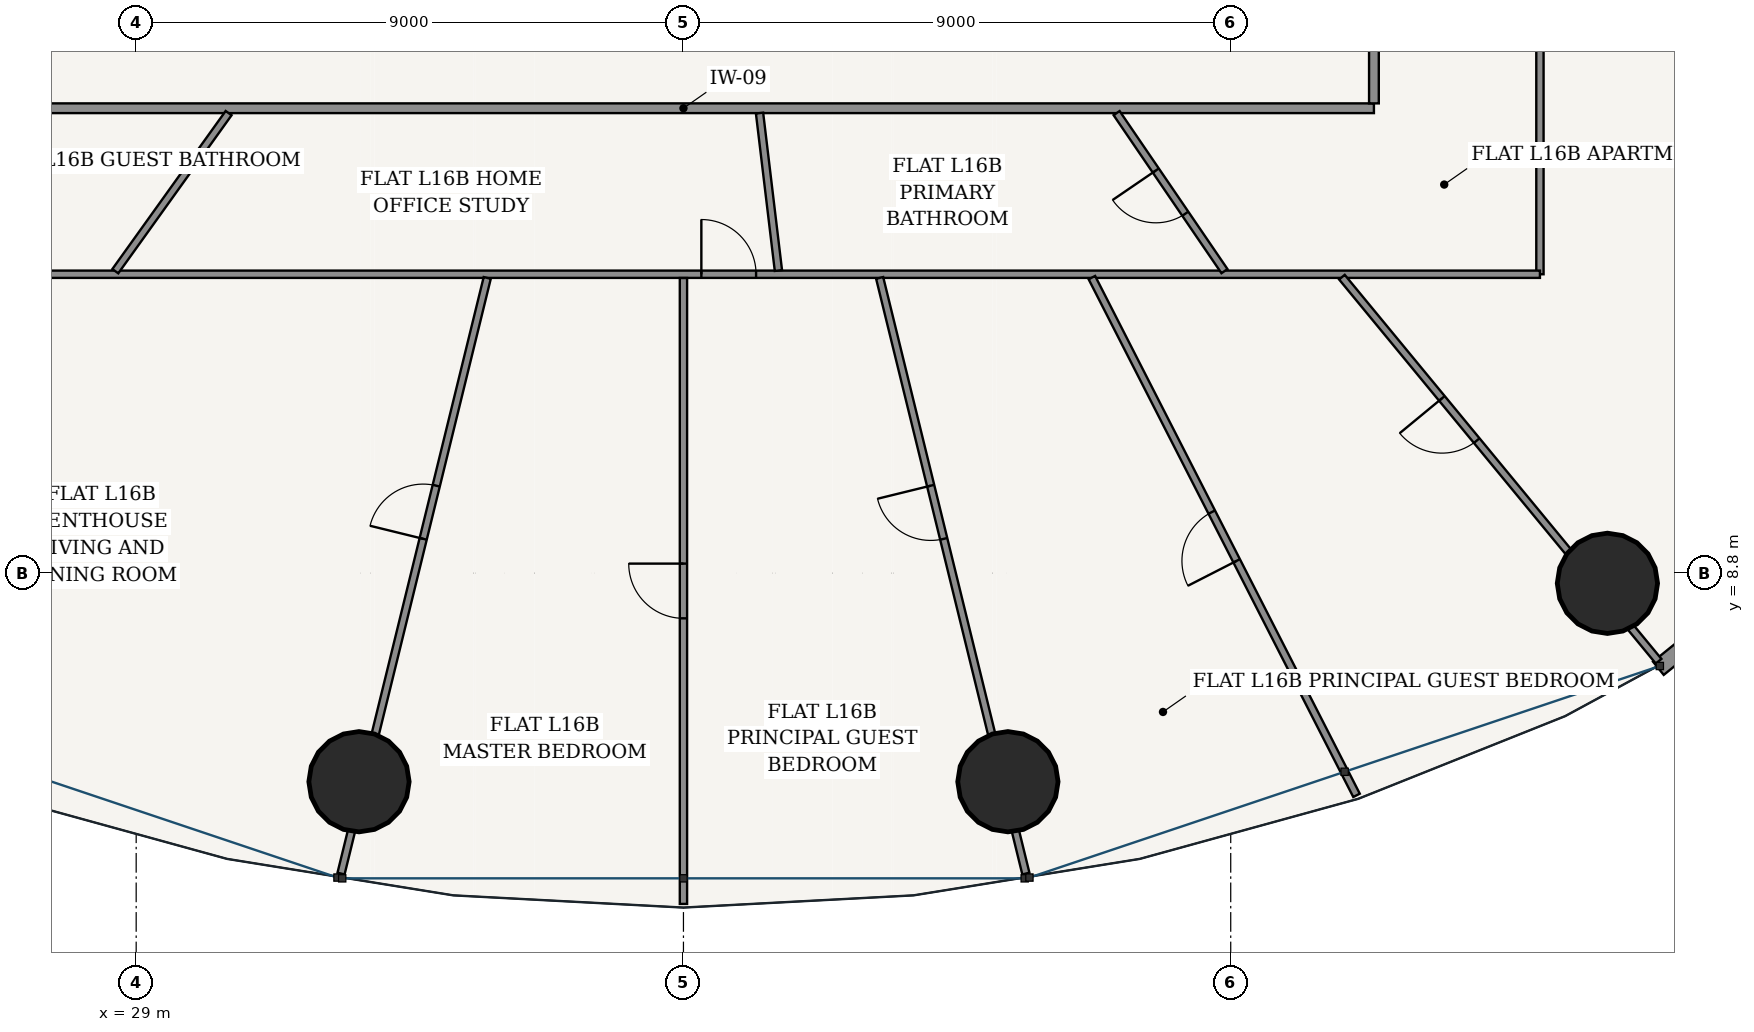
"""IFC4 building model, lengths in metres.
Left out: names, types, materials, properties, quantities, classifications, styles, units other than length and angle.
Written with IfcOpenShell. Run it as: python <this file> out.ifc"""

import sys

from ifc_helpers import new_model, si_unit, direction, frame, frame_2d, origin, origin_2d, place, context, subcontext, project, spatial, rectangle, hollow_circle, extrude, source, transform, mapped, element, fill, save


model = new_model("IFC4")
c1 = context("Model", 3, precision=1e-05, world=origin(), true_north=direction((-0.2419218956, 0.970295726276)))
c2 = subcontext(c1, "Body", "Model", "MODEL_VIEW")
j1 = project(units=[si_unit("LENGTHUNIT", "METRE"), si_unit("PLANEANGLEUNIT", "RADIAN")], contexts=[c1])
p1 = place(None, origin())
s1 = spatial("IfcSite", under=j1, at=p1, CompositionType="ELEMENT")
p2 = place(p1, origin())
s2 = spatial("IfcBuilding", under=s1, at=p2, CompositionType="ELEMENT")
p3 = place(p2, frame((0.0, 0.0, 63.6)))
s3 = spatial("IfcBuildingStorey", under=s2, at=p3, CompositionType="ELEMENT", Elevation=63.6)
for number, where, z_axis, x_axis in (
    (1, (32.664, 5.37, 0.0), (0.0, 0.0, 1.0), (1.0, 0.0, 0.0)),
    (2, (43.336, 5.37, 0.0), (0.0, 0.0, 1.0), (1.0, 0.0, 0.0)),
    (3, (53.195, 8.632, 0.0), (0.0, 0.0, 1.0), (1.0, 0.0, 0.0)),
):
    element("IfcColumn", number, at=place(p3, frame(where, z_axis=z_axis, x_axis=x_axis)), inside=s3, PredefinedType="COLUMN", context=c2, shape_type="SweptSolid", body=[
        extrude(hollow_circle(Radius=0.825, WallThickness=0.05, at=origin_2d()), origin(), (0.0, 0.0, 1.0), 3.6),
    ])
p4 = place(p3, frame((54.033, 7.235, 0.0), z_axis=(0.0, 0.0, 1.0), x_axis=(0.777016782851, 0.629479879875, 0.0)))
e4 = element("IfcWall", 4, at=p4, inside=s3, PredefinedType="SOLIDWALL", context=c2, shape_type="SweptSolid", body=[
    extrude(rectangle(XDim=10.447, YDim=0.28, at=frame_2d((5.223, 0.0))), origin(), (0.0, 0.0, 1.0), 3.32),
])
p5 = place(p4, frame((1.771, 0.0, 0.85)))
e5 = element("IfcOpeningElement", 5, at=p5, cuts=e4, PredefinedType="OPENING", context=c2, shape_type="SweptSolid", body=[
    extrude(rectangle(XDim=2.1, YDim=1.95, at=frame_2d((1.05, 0.975))), frame((0.0, 0.15, 0.0), z_axis=(0.0, -1.0, 0.0), x_axis=(1.0, 0.0, 0.0)), (0.0, 0.0, 1.0), 0.3),
])
p6 = place(p4, frame((6.576, 0.0, 0.85)))
e6 = element("IfcOpeningElement", 6, at=p6, cuts=e4, PredefinedType="OPENING", context=c2, shape_type="SweptSolid", body=[
    extrude(rectangle(XDim=2.1, YDim=1.95, at=frame_2d((1.05, 0.975))), frame((0.0, 0.15, 0.0), z_axis=(0.0, -1.0, 0.0), x_axis=(1.0, 0.0, 0.0)), (0.0, 0.0, 1.0), 0.3),
])
p7 = place(p3, frame((26.645, 16.445, 0.0), z_axis=(0.0, 0.0, 1.0), x_axis=(1.0, 0.0, 0.0)))
e7 = element("IfcWall", 7, at=p7, inside=s3, PredefinedType="PARTITIONING", context=c2, shape_type="SweptSolid", body=[
    extrude(rectangle(XDim=22.71, YDim=0.16, at=frame_2d((11.355, 0.0))), origin(), (0.0, 0.0, 1.0), 2.688),
])
p8 = place(p3, frame((49.355, 16.525, 0.0), z_axis=(0.0, 0.0, 1.0), x_axis=(0.0, 1.0, 0.0)))
e8 = element("IfcWall", 8, at=p8, inside=s3, PredefinedType="PARTITIONING", context=c2, shape_type="SweptSolid", body=[
    extrude(rectangle(XDim=20.55, YDim=0.16, at=frame_2d((10.275, 0.0))), origin(), (0.0, 0.0, 1.0), 2.688),
])
p9 = place(p8, frame((2.733, 0.0, 0.0)))
e9 = element("IfcOpeningElement", 9, at=p9, cuts=e8, PredefinedType="OPENING", context=c2, shape_type="SweptSolid", body=[
    extrude(rectangle(XDim=0.98, YDim=2.2, at=frame_2d((0.49, 1.1))), frame((0.0, 0.09, 0.0), z_axis=(0.0, -1.0, 0.0), x_axis=(1.0, 0.0, 0.0)), (0.0, 0.0, 1.0), 0.18),
])
p10 = place(p3, frame((52.085, 34.324, 0.0), z_axis=(0.0, 0.0, 1.0), x_axis=(0.0, -1.0, 0.0)))
e10 = element("IfcWall", 10, at=p10, inside=s3, PredefinedType="PARTITIONING", context=c2, shape_type="SweptSolid", body=[
    extrude(rectangle(XDim=20.609, YDim=0.12, at=frame_2d((10.305, 0.0))), origin(), (0.0, 0.0, 1.0), 2.688),
])
p11 = place(p10, frame((15.972, 0.0, 0.0)))
e11 = element("IfcOpeningElement", 11, at=p11, cuts=e10, PredefinedType="OPENING", context=c2, shape_type="SweptSolid", body=[
    extrude(rectangle(XDim=0.9, YDim=2.15, at=frame_2d((0.45, 1.075))), frame((0.0, 0.07, 0.0), z_axis=(0.0, -1.0, 0.0), x_axis=(1.0, 0.0, 0.0)), (0.0, 0.0, 1.0), 0.14),
])
p12 = place(p10, frame((3.058, 0.0, 0.0)))
e12 = element("IfcOpeningElement", 12, at=p12, cuts=e10, PredefinedType="OPENING", context=c2, shape_type="SweptSolid", body=[
    extrude(rectangle(XDim=0.9, YDim=2.15, at=frame_2d((0.45, 1.075))), frame((0.0, 0.07, 0.0), z_axis=(0.0, -1.0, 0.0), x_axis=(1.0, 0.0, 0.0)), (0.0, 0.0, 1.0), 0.14),
])
p13 = place(p3, frame((52.085, 13.715, 0.0), z_axis=(0.0, 0.0, 1.0), x_axis=(-1.0, 0.0, 0.0)))
e13 = element("IfcWall", 13, at=p13, inside=s3, PredefinedType="PARTITIONING", context=c2, shape_type="SweptSolid", body=[
    extrude(rectangle(XDim=28.17, YDim=0.12, at=frame_2d((14.085, 0.0))), origin(), (0.0, 0.0, 1.0), 2.688),
])
p14 = place(p13, frame((12.891, 0.0, 0.0)))
e14 = element("IfcOpeningElement", 14, at=p14, cuts=e13, PredefinedType="OPENING", context=c2, shape_type="SweptSolid", body=[
    extrude(rectangle(XDim=0.9, YDim=2.15, at=frame_2d((0.45, 1.075))), frame((0.0, 0.07, 0.0), z_axis=(0.0, -1.0, 0.0), x_axis=(1.0, 0.0, 0.0)), (0.0, 0.0, 1.0), 0.14),
])
p15 = place(p3, frame((34.773, 13.655, 0.0), z_axis=(0.0, 0.0, 1.0), x_axis=(-0.238375747469, -0.97117300365, 0.0)))
e15 = element("IfcWall", 15, at=p15, inside=s3, PredefinedType="PARTITIONING", context=c2, shape_type="SweptSolid", body=[
    extrude(rectangle(XDim=10.086, YDim=0.12, at=frame_2d((5.043, 0.0))), origin(), (0.0, 0.0, 1.0), 2.688),
])
p16 = place(p15, frame((3.518, 0.0, 0.0)))
e16 = element("IfcOpeningElement", 16, at=p16, cuts=e15, PredefinedType="OPENING", context=c2, shape_type="SweptSolid", body=[
    extrude(rectangle(XDim=0.9, YDim=2.15, at=frame_2d((0.45, 1.075))), frame((0.0, 0.07, 0.0), z_axis=(0.0, -1.0, 0.0), x_axis=(1.0, 0.0, 0.0)), (0.0, 0.0, 1.0), 0.14),
])
p17 = place(p3, frame((38.0, 13.653, 0.0), z_axis=(0.0, 0.0, 1.0), x_axis=(0.0, -1.0, 0.0)))
e17 = element("IfcWall", 17, at=p17, inside=s3, PredefinedType="PARTITIONING", context=c2, shape_type="SweptSolid", body=[
    extrude(rectangle(XDim=10.293, YDim=0.12, at=frame_2d((5.146, 0.0))), origin(), (0.0, 0.0, 1.0), 2.762),
])
p18 = place(p17, frame((4.697, 0.0, 0.0)))
e18 = element("IfcOpeningElement", 18, at=p18, cuts=e17, PredefinedType="OPENING", context=c2, shape_type="SweptSolid", body=[
    extrude(rectangle(XDim=0.9, YDim=2.15, at=frame_2d((0.45, 1.075))), frame((0.0, 0.07, 0.0), z_axis=(0.0, -1.0, 0.0), x_axis=(1.0, 0.0, 0.0)), (0.0, 0.0, 1.0), 0.14),
])
p19 = place(p3, frame((41.227, 13.655, 0.0), z_axis=(0.0, 0.0, 1.0), x_axis=(0.238375747469, -0.97117300365, 0.0)))
e19 = element("IfcWall", 19, at=p19, inside=s3, PredefinedType="PARTITIONING", context=c2, shape_type="SweptSolid", body=[
    extrude(rectangle(XDim=10.086, YDim=0.12, at=frame_2d((5.043, 0.0))), origin(), (0.0, 0.0, 1.0), 2.688),
])
p20 = place(p19, frame((3.519, 0.0, 0.0)))
e20 = element("IfcOpeningElement", 20, at=p20, cuts=e19, PredefinedType="OPENING", context=c2, shape_type="SweptSolid", body=[
    extrude(rectangle(XDim=0.9, YDim=2.15, at=frame_2d((0.45, 1.075))), frame((0.0, 0.07, 0.0), z_axis=(0.0, -1.0, 0.0), x_axis=(1.0, 0.0, 0.0)), (0.0, 0.0, 1.0), 0.14),
])
p21 = place(p3, frame((44.717, 13.66, 0.0), z_axis=(0.0, 0.0, 1.0), x_axis=(0.455131303234, -0.890424335256, 0.0)))
e21 = element("IfcWall", 21, at=p21, inside=s3, PredefinedType="PARTITIONING", context=c2, shape_type="SweptSolid", body=[
    extrude(rectangle(XDim=9.562, YDim=0.12, at=frame_2d((4.781, 0.0))), origin(), (0.0, 0.0, 1.0), 2.762),
])
p22 = place(p21, frame((4.331, 0.0, 0.0)))
e22 = element("IfcOpeningElement", 22, at=p22, cuts=e21, PredefinedType="OPENING", context=c2, shape_type="SweptSolid", body=[
    extrude(rectangle(XDim=0.9, YDim=2.15, at=frame_2d((0.45, 1.075))), frame((0.0, 0.07, 0.0), z_axis=(0.0, -1.0, 0.0), x_axis=(1.0, 0.0, 0.0)), (0.0, 0.0, 1.0), 0.14),
])
p23 = place(p3, frame((48.829, 13.667, 0.0), z_axis=(0.0, 0.0, 1.0), x_axis=(0.636177533893, -0.771542704826, 0.0)))
e23 = element("IfcWall", 23, at=p23, inside=s3, PredefinedType="PARTITIONING", context=c2, shape_type="SweptSolid", body=[
    extrude(rectangle(XDim=8.187, YDim=0.12, at=frame_2d((4.093, 0.0))), origin(), (0.0, 0.0, 1.0), 2.688),
])
p24 = place(p23, frame((2.584, 0.0, 0.0)))
e24 = element("IfcOpeningElement", 24, at=p24, cuts=e23, PredefinedType="OPENING", context=c2, shape_type="SweptSolid", body=[
    extrude(rectangle(XDim=0.9, YDim=2.15, at=frame_2d((0.45, 1.075))), frame((0.0, 0.07, 0.0), z_axis=(0.0, -1.0, 0.0), x_axis=(1.0, 0.0, 0.0)), (0.0, 0.0, 1.0), 0.14),
])
p25 = place(p3, frame((30.52, 16.365, 0.0), z_axis=(0.0, 0.0, 1.0), x_axis=(-0.582566008831, -0.812783393872, 0.0)))
e25 = element("IfcWall", 25, at=p25, inside=s3, PredefinedType="PARTITIONING", context=c2, shape_type="SweptSolid", body=[
    extrude(rectangle(XDim=3.198, YDim=0.12, at=frame_2d((1.599, 0.0))), origin(), (0.0, 0.0, 1.0), 3.32),
])
p26 = place(p3, frame((39.251, 16.365, 0.0), z_axis=(0.0, 0.0, 1.0), x_axis=(0.1191230636, -0.992879497078, 0.0)))
e26 = element("IfcWall", 26, at=p26, inside=s3, PredefinedType="PARTITIONING", context=c2, shape_type="SweptSolid", body=[
    extrude(rectangle(XDim=2.607, YDim=0.12, at=frame_2d((1.303, 0.0))), origin(), (0.0, 0.0, 1.0), 3.32),
])
p27 = place(p3, frame((45.123, 16.365, 0.0), z_axis=(0.0, 0.0, 1.0), x_axis=(0.563762888243, -0.825936683917, 0.0)))
e27 = element("IfcWall", 27, at=p27, inside=s3, PredefinedType="PARTITIONING", context=c2, shape_type="SweptSolid", body=[
    extrude(rectangle(XDim=3.146, YDim=0.12, at=frame_2d((1.573, 0.0))), origin(), (0.0, 0.0, 1.0), 3.32),
])
p28 = place(p27, frame((1.143, 0.0, 0.0)))
e28 = element("IfcOpeningElement", 28, at=p28, cuts=e27, PredefinedType="OPENING", context=c2, shape_type="SweptSolid", body=[
    extrude(rectangle(XDim=0.86, YDim=2.15, at=frame_2d((0.43, 1.075))), frame((0.0, 0.07, 0.0), z_axis=(0.0, -1.0, 0.0), x_axis=(1.0, 0.0, 0.0)), (0.0, 0.0, 1.0), 0.14),
])
m1 = source(origin(), c2, "Body", "SweptSolid", [
    extrude(rectangle(XDim=0.86, YDim=2.15, at=frame_2d((0.43, 1.075))), frame((0.0, 0.025, 0.0), z_axis=(0.0, -1.0, 0.0), x_axis=(1.0, 0.0, 0.0)), (0.0, 0.0, 1.0), 0.05),
])
p29 = place(p28, frame((0.86, 0.0, 0.0), z_axis=(0.0, 0.0, 1.0), x_axis=(-1.0, 0.0, 0.0)))
e29 = element("IfcDoor", 29, at=p29, inside=s3, OperationType="SINGLE_SWING_RIGHT", PredefinedType="DOOR", context=c2, shape_type="MappedRepresentation", body=[
    mapped(m1, transform((0.0, 0.0, 0.0), scale=1.0)),
])
fill(e28, e29)
m2 = source(origin(), c2, "Body", "SweptSolid", [
    extrude(rectangle(XDim=0.9, YDim=2.15, at=frame_2d((0.45, 1.075))), frame((0.0, 0.025, 0.0), z_axis=(0.0, -1.0, 0.0), x_axis=(1.0, 0.0, 0.0)), (0.0, 0.0, 1.0), 0.05),
])
p30 = place(p24, frame((0.9, 0.0, 0.0), z_axis=(0.0, 0.0, 1.0), x_axis=(-1.0, 0.0, 0.0)))
e30 = element("IfcDoor", 30, at=p30, inside=s3, OperationType="SINGLE_SWING_RIGHT", PredefinedType="DOOR", context=c2, shape_type="MappedRepresentation", body=[
    mapped(m2, transform((0.0, 0.0, 0.0), scale=1.0)),
])
fill(e24, e30)
p31 = place(p22, frame((0.9, 0.0, 0.0), z_axis=(0.0, 0.0, 1.0), x_axis=(-1.0, 0.0, 0.0)))
e31 = element("IfcDoor", 31, at=p31, inside=s3, OperationType="SINGLE_SWING_LEFT", PredefinedType="DOOR", context=c2, shape_type="MappedRepresentation", body=[
    mapped(m2, transform((0.0, 0.0, 0.0), scale=1.0)),
])
fill(e22, e31)
p32 = place(p20, frame((0.9, 0.0, 0.0), z_axis=(0.0, 0.0, 1.0), x_axis=(-1.0, 0.0, 0.0)))
e32 = element("IfcDoor", 32, at=p32, inside=s3, OperationType="SINGLE_SWING_RIGHT", PredefinedType="DOOR", context=c2, shape_type="MappedRepresentation", body=[
    mapped(m2, transform((0.0, 0.0, 0.0), scale=1.0)),
])
fill(e20, e32)
p33 = place(p14, frame((0.9, 0.0, 0.0), z_axis=(0.0, 0.0, 1.0), x_axis=(-1.0, 0.0, 0.0)))
e33 = element("IfcDoor", 33, at=p33, inside=s3, OperationType="SINGLE_SWING_LEFT", PredefinedType="DOOR", context=c2, shape_type="MappedRepresentation", body=[
    mapped(m2, transform((0.0, 0.0, 0.0), scale=1.0)),
])
fill(e14, e33)
p34 = place(p18, frame((0.9, 0.0, 0.0), z_axis=(0.0, 0.0, 1.0), x_axis=(-1.0, 0.0, 0.0)))
e34 = element("IfcDoor", 34, at=p34, inside=s3, OperationType="SINGLE_SWING_RIGHT", PredefinedType="DOOR", context=c2, shape_type="MappedRepresentation", body=[
    mapped(m2, transform((0.0, 0.0, 0.0), scale=1.0)),
])
fill(e18, e34)
p35 = place(p16, frame((0.9, 0.0, 0.0), z_axis=(0.0, 0.0, 1.0), x_axis=(-1.0, 0.0, 0.0)))
e35 = element("IfcDoor", 35, at=p35, inside=s3, OperationType="SINGLE_SWING_LEFT", PredefinedType="DOOR", context=c2, shape_type="MappedRepresentation", body=[
    mapped(m2, transform((0.0, 0.0, 0.0), scale=1.0)),
])
fill(e16, e35)
save(model, sys.argv[1])
